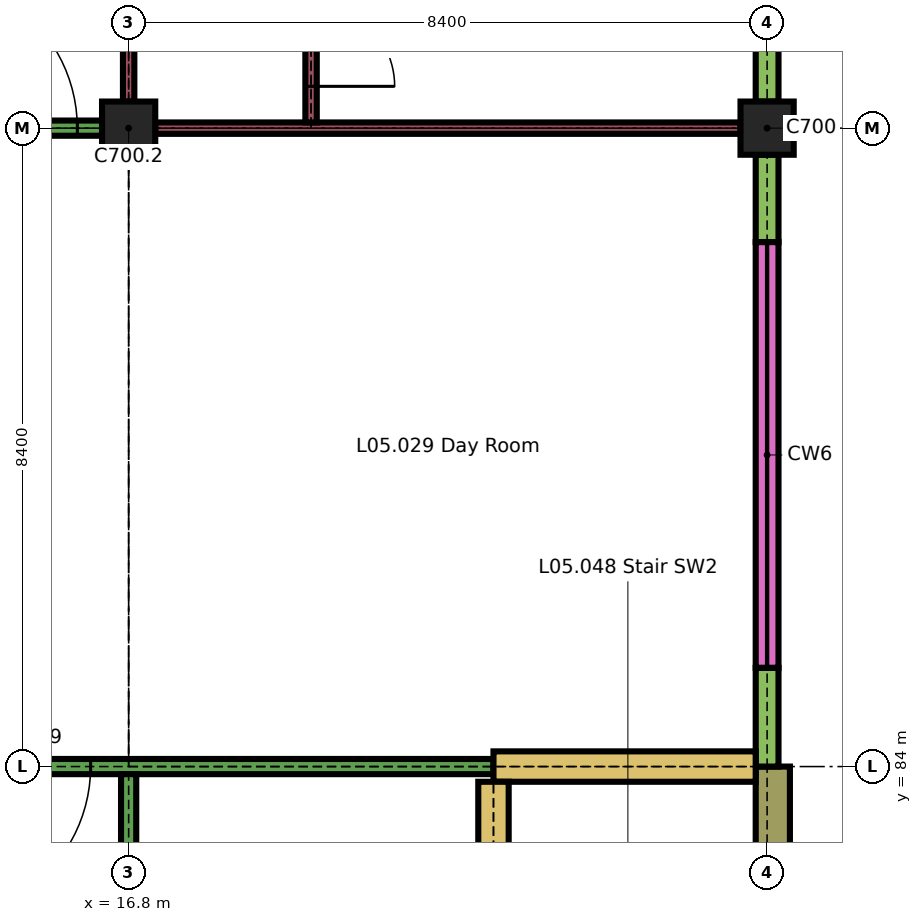
"""IFC4 building model, lengths in metres.
Left out: names, types, materials, properties, quantities, classifications, styles, units other than length and angle.
Written with IfcOpenShell. Run it as: python <this file> out.ifc"""

import sys

from ifc_helpers import new_model, si_unit, direction, frame, frame_2d, origin, origin_2d, place, context, subcontext, project, spatial, rectangle, extrude, element, fill, save


model = new_model("IFC4")
c1 = context("Model", 3, precision=1e-05, world=origin(), true_north=direction((0.0, 1.0)))
c2 = subcontext(c1, "Body", "Model", "MODEL_VIEW")
j1 = project(units=[si_unit("LENGTHUNIT", "METRE"), si_unit("PLANEANGLEUNIT", "RADIAN")], contexts=[c1])
p1 = place(None, origin())
s1 = spatial("IfcSite", under=j1, at=p1, CompositionType="ELEMENT")
p2 = place(p1, origin())
s2 = spatial("IfcBuilding", under=s1, at=p2, CompositionType="ELEMENT")
p3 = place(p2, frame((0.0, 0.0, 22.5)))
s3 = spatial("IfcBuildingStorey", under=s2, at=p3, CompositionType="ELEMENT", Elevation=22.5)
for number, where, z_axis, x_axis in (
    (1, (16.8, 92.4, 0.0), (0.0, 0.0, 1.0), (1.0, 0.0, 0.0)),
    (2, (25.2, 92.4, 0.0), (0.0, 0.0, 1.0), (1.0, 0.0, 0.0)),
):
    element("IfcColumn", number, at=place(p3, frame(where, z_axis=z_axis, x_axis=x_axis)), inside=s3, PredefinedType="COLUMN", context=c2, shape_type="SweptSolid", body=[
        extrude(rectangle(XDim=0.7, YDim=0.7, at=origin_2d()), origin(), (0.0, 0.0, 1.0), 3.26),
    ])
p4 = place(p3, frame((25.275, 80.15, 0.0), z_axis=(0.0, 0.0, 1.0), x_axis=(0.0, 1.0, 0.0)))
e3 = element("IfcWall", 3, at=p4, inside=s3, PredefinedType="SOLIDWALL", context=c2, shape_type="SweptSolid", body=[
    extrude(rectangle(XDim=3.85, YDim=0.45, at=frame_2d((1.925, 0.0))), origin(), (0.0, 0.0, 1.0), 3.26),
])
p5 = place(p3, frame((25.2, 84.0, 0.0), z_axis=(0.0, 0.0, 1.0), x_axis=(0.0, 1.0, 0.0)))
e4 = element("IfcWall", 4, at=p5, inside=s3, PredefinedType="SOLIDWALL", context=c2, shape_type="SweptSolid", body=[
    extrude(rectangle(XDim=1.3, YDim=0.3, at=frame_2d((0.65, 0.0))), origin(), (0.0, 0.0, 1.0), 2.96),
])
p6 = place(p3, frame((25.2, 90.9, 0.0), z_axis=(0.0, 0.0, 1.0), x_axis=(0.0, 1.0, 0.0)))
e5 = element("IfcWall", 5, at=p6, inside=s3, PredefinedType="SOLIDWALL", context=c2, shape_type="SweptSolid", body=[
    extrude(rectangle(XDim=1.15, YDim=0.3, at=frame_2d((0.575, 0.0))), origin(), (0.0, 0.0, 1.0), 2.96),
])
p7 = place(p3, frame((25.2, 85.3, 0.0), z_axis=(0.0, 0.0, 1.0), x_axis=(0.0, 1.0, 0.0)))
e6 = element("IfcWall", 6, at=p7, inside=s3, PredefinedType="SOLIDWALL", context=c2, shape_type="SweptSolid", body=[
    extrude(rectangle(XDim=5.6, YDim=0.3, at=frame_2d((2.8, 0.0))), origin(), (0.0, 0.0, 1.0), 0.6),
])
p8 = place(p3, frame((25.2, 92.75, 0.0), z_axis=(0.0, 0.0, 1.0), x_axis=(0.0, 1.0, 0.0)))
e7 = element("IfcWall", 7, at=p8, inside=s3, PredefinedType="SOLIDWALL", context=c2, shape_type="SweptSolid", body=[
    extrude(rectangle(XDim=3.85, YDim=0.3, at=frame_2d((1.925, 0.0))), origin(), (0.0, 0.0, 1.0), 2.96),
])
p9 = place(p8, frame((0.7, 0.0, 0.9)))
e8 = element("IfcOpeningElement", 8, at=p9, cuts=e7, PredefinedType="OPENING", context=c2, shape_type="SweptSolid", body=[
    extrude(rectangle(XDim=2.1, YDim=1.5, at=frame_2d((1.05, 0.75))), frame((0.0, 0.16, 0.0), z_axis=(0.0, -1.0, 0.0), x_axis=(1.0, 0.0, 0.0)), (0.0, 0.0, 1.0), 0.32),
])
p10 = place(p3, frame((8.75, 84.0, 0.0), z_axis=(0.0, 0.0, 1.0), x_axis=(1.0, 0.0, 0.0)))
e9 = element("IfcWall", 9, at=p10, inside=s3, PredefinedType="PARTITIONING", context=c2, shape_type="SweptSolid", body=[
    extrude(rectangle(XDim=12.85, YDim=0.2, at=frame_2d((6.425, 0.0))), origin(), (0.0, 0.0, 1.0), 3.26),
])
p11 = place(p10, frame((0.325, 0.0, 0.0)))
e10 = element("IfcOpeningElement", 10, at=p11, cuts=e9, PredefinedType="OPENING", context=c2, shape_type="SweptSolid", body=[
    extrude(rectangle(XDim=2.0, YDim=2.4, at=frame_2d((1.0, 1.2))), frame((0.0, 0.11, 0.0), z_axis=(0.0, -1.0, 0.0), x_axis=(1.0, 0.0, 0.0)), (0.0, 0.0, 1.0), 0.22),
])
p12 = place(p10, frame((5.55, 0.0, 0.0)))
e11 = element("IfcOpeningElement", 11, at=p12, cuts=e9, PredefinedType="OPENING", context=c2, shape_type="SweptSolid", body=[
    extrude(rectangle(XDim=2.0, YDim=2.4, at=frame_2d((1.0, 1.2))), frame((0.0, 0.11, 0.0), z_axis=(0.0, -1.0, 0.0), x_axis=(1.0, 0.0, 0.0)), (0.0, 0.0, 1.0), 0.22),
])
p13 = place(p3, frame((21.6, 84.0, 0.0), z_axis=(0.0, 0.0, 1.0), x_axis=(1.0, 0.0, 0.0)))
e12 = element("IfcWall", 12, at=p13, inside=s3, PredefinedType="SHEAR", context=c2, shape_type="SweptSolid", body=[
    extrude(rectangle(XDim=3.45, YDim=0.4, at=frame_2d((1.725, 0.0))), origin(), (0.0, 0.0, 1.0), 3.26),
])
p14 = place(p3, frame((8.75, 92.4, 0.0), z_axis=(0.0, 0.0, 1.0), x_axis=(1.0, 0.0, 0.0)))
e13 = element("IfcWall", 13, at=p14, inside=s3, PredefinedType="PARTITIONING", context=c2, shape_type="SweptSolid", body=[
    extrude(rectangle(XDim=7.7, YDim=0.2, at=frame_2d((3.85, 0.0))), origin(), (0.0, 0.0, 1.0), 3.26),
])
p15 = place(p14, frame((0.325, 0.0, 0.0)))
e14 = element("IfcOpeningElement", 14, at=p15, cuts=e13, PredefinedType="OPENING", context=c2, shape_type="SweptSolid", body=[
    extrude(rectangle(XDim=2.0, YDim=2.4, at=frame_2d((1.0, 1.2))), frame((0.0, 0.11, 0.0), z_axis=(0.0, -1.0, 0.0), x_axis=(1.0, 0.0, 0.0)), (0.0, 0.0, 1.0), 0.22),
])
p16 = place(p14, frame((5.375, 0.0, 0.0)))
e15 = element("IfcOpeningElement", 15, at=p16, cuts=e13, PredefinedType="OPENING", context=c2, shape_type="SweptSolid", body=[
    extrude(rectangle(XDim=2.0, YDim=2.4, at=frame_2d((1.0, 1.2))), frame((0.0, 0.11, 0.0), z_axis=(0.0, -1.0, 0.0), x_axis=(1.0, 0.0, 0.0)), (0.0, 0.0, 1.0), 0.22),
])
p17 = place(p3, frame((17.15, 92.4, 0.0), z_axis=(0.0, 0.0, 1.0), x_axis=(1.0, 0.0, 0.0)))
e16 = element("IfcWall", 16, at=p17, inside=s3, PredefinedType="PARTITIONING", context=c2, shape_type="SweptSolid", body=[
    extrude(rectangle(XDim=7.7, YDim=0.15, at=frame_2d((3.85, 0.0))), origin(), (0.0, 0.0, 1.0), 3.26),
])
p18 = place(p3, frame((16.8, 75.6, 0.0), z_axis=(0.0, 0.0, 1.0), x_axis=(0.0, 1.0, 0.0)))
e17 = element("IfcWall", 17, at=p18, inside=s3, PredefinedType="PARTITIONING", context=c2, shape_type="SweptSolid", body=[
    extrude(rectangle(XDim=8.3, YDim=0.2, at=frame_2d((4.15, 0.0))), origin(), (0.0, 0.0, 1.0), 3.26),
])
p19 = place(p18, frame((3.15, 0.0, 0.0)))
e18 = element("IfcOpeningElement", 18, at=p19, cuts=e17, PredefinedType="OPENING", context=c2, shape_type="SweptSolid", body=[
    extrude(rectangle(XDim=2.0, YDim=2.4, at=frame_2d((1.0, 1.2))), frame((0.0, 0.11, 0.0), z_axis=(0.0, -1.0, 0.0), x_axis=(1.0, 0.0, 0.0)), (0.0, 0.0, 1.0), 0.22),
])
p20 = place(p3, frame((16.8, 92.75, 0.0), z_axis=(0.0, 0.0, 1.0), x_axis=(0.0, 1.0, 0.0)))
e19 = element("IfcWall", 19, at=p20, inside=s3, PredefinedType="PARTITIONING", context=c2, shape_type="SweptSolid", body=[
    extrude(rectangle(XDim=7.7, YDim=0.15, at=frame_2d((3.85, 0.0))), origin(), (0.0, 0.0, 1.0), 3.26),
])
p21 = place(p20, frame((2.1, 0.0, 0.0)))
e20 = element("IfcOpeningElement", 20, at=p21, cuts=e19, PredefinedType="OPENING", context=c2, shape_type="SweptSolid", body=[
    extrude(rectangle(XDim=1.5, YDim=2.4, at=frame_2d((0.75, 1.2))), frame((0.0, 0.085, 0.0), z_axis=(0.0, -1.0, 0.0), x_axis=(1.0, 0.0, 0.0)), (0.0, 0.0, 1.0), 0.17),
])
p22 = place(p20, frame((4.1, 0.0, 0.0)))
e21 = element("IfcOpeningElement", 21, at=p22, cuts=e19, PredefinedType="OPENING", context=c2, shape_type="SweptSolid", body=[
    extrude(rectangle(XDim=1.5, YDim=2.4, at=frame_2d((0.75, 1.2))), frame((0.0, 0.085, 0.0), z_axis=(0.0, -1.0, 0.0), x_axis=(1.0, 0.0, 0.0)), (0.0, 0.0, 1.0), 0.17),
])
p23 = place(p3, frame((19.2, 92.475, 0.0), z_axis=(0.0, 0.0, 1.0), x_axis=(0.0, 1.0, 0.0)))
e22 = element("IfcWall", 22, at=p23, inside=s3, PredefinedType="PARTITIONING", context=c2, shape_type="SweptSolid", body=[
    extrude(rectangle(XDim=2.05, YDim=0.15, at=frame_2d((1.025, 0.0))), origin(), (0.0, 0.0, 1.0), 3.26),
])
p24 = place(p23, frame((0.475, 0.0, 0.0)))
e23 = element("IfcOpeningElement", 23, at=p24, cuts=e22, PredefinedType="OPENING", context=c2, shape_type="SweptSolid", body=[
    extrude(rectangle(XDim=1.1, YDim=2.1, at=frame_2d((0.55, 1.05))), frame((0.0, 0.085, 0.0), z_axis=(0.0, -1.0, 0.0), x_axis=(1.0, 0.0, 0.0)), (0.0, 0.0, 1.0), 0.17),
])
p25 = place(p3, frame((21.6, 75.8, 0.0), z_axis=(0.0, 0.0, 1.0), x_axis=(0.0, 1.0, 0.0)))
e24 = element("IfcWall", 24, at=p25, inside=s3, PredefinedType="SHEAR", context=c2, shape_type="SweptSolid", body=[
    extrude(rectangle(XDim=8.0, YDim=0.4, at=frame_2d((4.0, 0.0))), origin(), (0.0, 0.0, 1.0), 3.26),
])
p26 = place(p25, frame((0.4, 0.0, 0.0)))
e25 = element("IfcOpeningElement", 25, at=p26, cuts=e24, PredefinedType="OPENING", context=c2, shape_type="SweptSolid", body=[
    extrude(rectangle(XDim=1.2, YDim=2.1, at=frame_2d((0.6, 1.05))), frame((0.0, 0.21, 0.0), z_axis=(0.0, -1.0, 0.0), x_axis=(1.0, 0.0, 0.0)), (0.0, 0.0, 1.0), 0.42),
])
p27 = place(p12, origin())
e26 = element("IfcDoor", 26, at=p27, inside=s3, OperationType="SINGLE_SWING_LEFT", PredefinedType="DOOR", context=c2, shape_type="SweptSolid", body=[
    extrude(rectangle(XDim=2.0, YDim=2.4, at=frame_2d((1.0, 1.2))), frame((0.0, 0.03, 0.0), z_axis=(0.0, -1.0, 0.0), x_axis=(1.0, 0.0, 0.0)), (0.0, 0.0, 1.0), 0.06),
])
fill(e11, e26)
p28 = place(p16, origin())
e27 = element("IfcDoor", 27, at=p28, inside=s3, OperationType="SINGLE_SWING_RIGHT", PredefinedType="DOOR", context=c2, shape_type="SweptSolid", body=[
    extrude(rectangle(XDim=2.0, YDim=2.4, at=frame_2d((1.0, 1.2))), frame((0.0, 0.03, 0.0), z_axis=(0.0, -1.0, 0.0), x_axis=(1.0, 0.0, 0.0)), (0.0, 0.0, 1.0), 0.06),
])
fill(e15, e27)
p29 = place(p24, origin())
e28 = element("IfcDoor", 28, at=p29, inside=s3, OperationType="SINGLE_SWING_LEFT", PredefinedType="DOOR", context=c2, shape_type="SweptSolid", body=[
    extrude(rectangle(XDim=1.1, YDim=2.1, at=frame_2d((0.55, 1.05))), frame((0.0, 0.025, 0.0), z_axis=(0.0, -1.0, 0.0), x_axis=(1.0, 0.0, 0.0)), (0.0, 0.0, 1.0), 0.05),
])
fill(e23, e28)
save(model, sys.argv[1])
